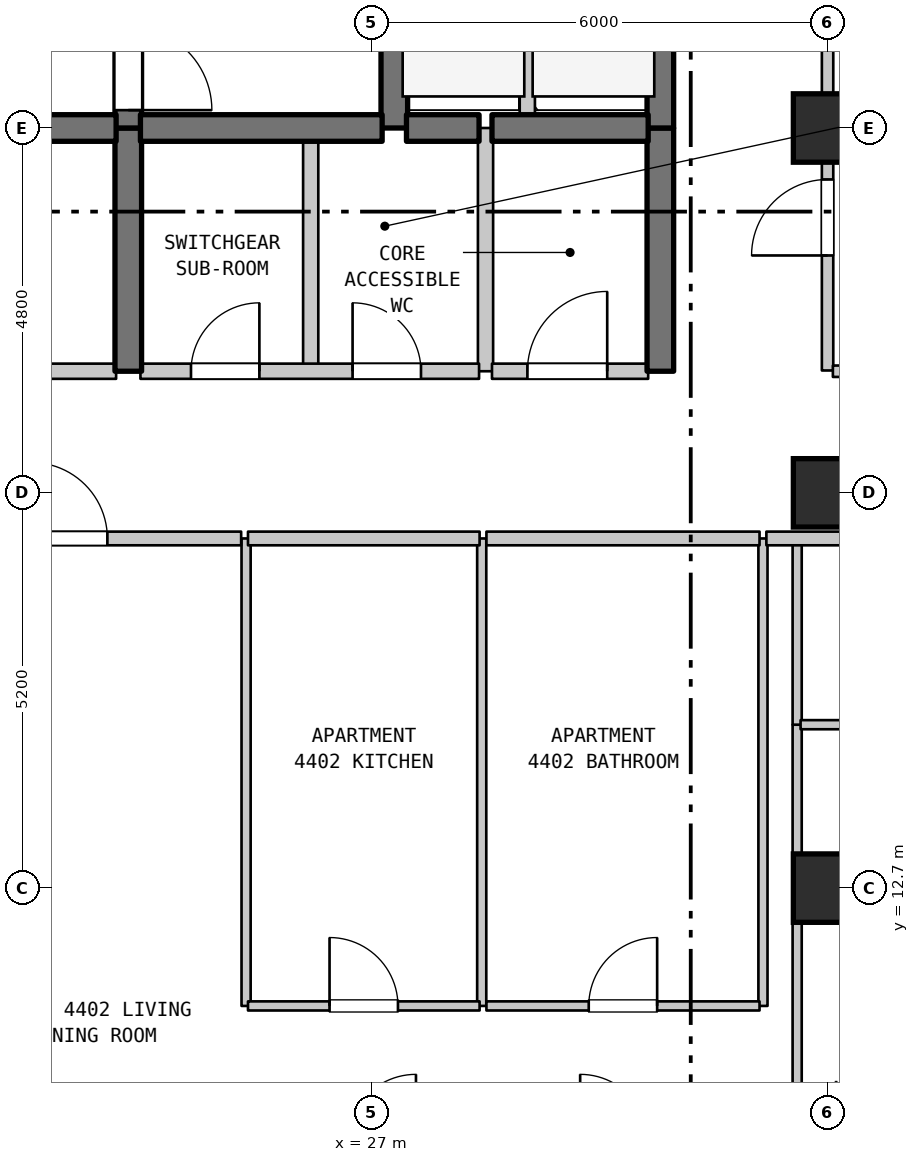
"""IFC4 building model, lengths in metres.
Left out: names, types, materials, properties, quantities, classifications, styles, units other than length and angle.
Written with IfcOpenShell. Run it as: python <this file> out.ifc"""

import sys

from ifc_helpers import new_model, si_unit, direction, frame, frame_2d, origin, origin_2d, place, context, subcontext, project, spatial, rectangle, extrude, element, fill, save


model = new_model("IFC4")
c1 = context("Model", 3, precision=1e-05, world=origin(), true_north=direction((0.0, 1.0)))
c2 = subcontext(c1, "Body", "Model", "MODEL_VIEW")
j1 = project(units=[si_unit("LENGTHUNIT", "METRE"), si_unit("PLANEANGLEUNIT", "RADIAN")], contexts=[c1])
p1 = place(None, origin())
s1 = spatial("IfcSite", under=j1, at=p1, CompositionType="ELEMENT")
p2 = place(p1, origin())
s2 = spatial("IfcBuilding", under=s1, at=p2, CompositionType="ELEMENT")
p3 = place(p2, frame((0.0, 0.0, 180.2)))
s3 = spatial("IfcBuildingStorey", under=s2, at=p3, CompositionType="ELEMENT", Elevation=180.2)
for number, where, z_axis, x_axis in (
    (1, (33.0, 12.7, 0.0), (0.0, 0.0, 1.0), (1.0, 0.0, 0.0)),
    (2, (33.0, 17.9, 0.0), (0.0, 0.0, 1.0), (1.0, 0.0, 0.0)),
    (3, (33.0, 22.7, 0.0), (0.0, 0.0, 1.0), (1.0, 0.0, 0.0)),
):
    element("IfcColumn", number, at=place(p3, frame(where, z_axis=z_axis, x_axis=x_axis)), inside=s3, PredefinedType="COLUMN", context=c2, shape_type="SweptSolid", body=[
        extrude(rectangle(XDim=0.9, YDim=0.9, at=origin_2d()), origin(), (0.0, 0.0, 1.0), 3.7),
    ])
p4 = place(p3, frame((23.8, 19.5, 0.0), z_axis=(0.0, 0.0, 1.0), x_axis=(0.0, 1.0, 0.0)))
e4 = element("IfcWall", 4, at=p4, inside=s3, PredefinedType="SHEAR", context=c2, shape_type="SweptSolid", body=[
    extrude(rectangle(XDim=3.2, YDim=0.35, at=frame_2d((1.6, 0.0))), origin(), (0.0, 0.0, 1.0), 3.38),
])
p5 = place(p3, frame((23.8, 22.7, 0.0), z_axis=(0.0, 0.0, 1.0), x_axis=(0.0, 1.0, 0.0)))
e5 = element("IfcWall", 5, at=p5, inside=s3, PredefinedType="SHEAR", context=c2, shape_type="SweptSolid", body=[
    extrude(rectangle(XDim=5.5, YDim=0.35, at=frame_2d((2.75, 0.0))), origin(), (0.0, 0.0, 1.0), 3.38),
])
p6 = place(p5, frame((0.235, 0.0, 0.0)))
e6 = element("IfcOpeningElement", 6, at=p6, cuts=e5, PredefinedType="OPENING", context=c2, shape_type="SweptSolid", body=[
    extrude(rectangle(XDim=1.1, YDim=2.15, at=frame_2d((0.55, 1.075))), frame((0.0, 0.185, 0.0), z_axis=(0.0, -1.0, 0.0), x_axis=(1.0, 0.0, 0.0)), (0.0, 0.0, 1.0), 0.37),
])
p7 = place(p3, frame((25.35, 11.15, 0.0), z_axis=(0.0, 0.0, 1.0), x_axis=(0.0, 1.0, 0.0)))
e7 = element("IfcWall", 7, at=p7, inside=s3, PredefinedType="PARTITIONING", context=c2, shape_type="SweptSolid", body=[
    extrude(rectangle(XDim=6.15, YDim=0.12, at=frame_2d((3.075, 0.0))), origin(), (0.0, 0.0, 1.0), 3.38),
])
p8 = place(p3, frame((26.2, 19.5, 0.0), z_axis=(0.0, 0.0, 1.0), x_axis=(0.0, 1.0, 0.0)))
e8 = element("IfcWall", 8, at=p8, inside=s3, PredefinedType="STANDARD", context=c2, shape_type="SweptSolid", body=[
    extrude(rectangle(XDim=3.2, YDim=0.2, at=frame_2d((1.6, 0.0))), origin(), (0.0, 0.0, 1.0), 3.38),
])
p9 = place(p3, frame((27.3, 22.7, 0.0), z_axis=(0.0, 0.0, 1.0), x_axis=(0.0, 1.0, 0.0)))
e9 = element("IfcWall", 9, at=p9, inside=s3, PredefinedType="SHEAR", context=c2, shape_type="SweptSolid", body=[
    extrude(rectangle(XDim=2.9, YDim=0.35, at=frame_2d((1.45, 0.0))), origin(), (0.0, 0.0, 1.0), 3.38),
])
p10 = place(p3, frame((28.45, 11.15, 0.0), z_axis=(0.0, 0.0, 1.0), x_axis=(0.0, 1.0, 0.0)))
e10 = element("IfcWall", 10, at=p10, inside=s3, PredefinedType="PARTITIONING", context=c2, shape_type="SweptSolid", body=[
    extrude(rectangle(XDim=6.15, YDim=0.12, at=frame_2d((3.075, 0.0))), origin(), (0.0, 0.0, 1.0), 3.38),
])
p11 = place(p3, frame((28.5, 19.5, 0.0), z_axis=(0.0, 0.0, 1.0), x_axis=(0.0, 1.0, 0.0)))
e11 = element("IfcWall", 11, at=p11, inside=s3, PredefinedType="STANDARD", context=c2, shape_type="SweptSolid", body=[
    extrude(rectangle(XDim=3.2, YDim=0.2, at=frame_2d((1.6, 0.0))), origin(), (0.0, 0.0, 1.0), 3.38),
])
p12 = place(p3, frame((29.05, 22.7, 0.0), z_axis=(0.0, 0.0, 1.0), x_axis=(0.0, 1.0, 0.0)))
e12 = element("IfcWall", 12, at=p12, inside=s3, PredefinedType="STANDARD", context=c2, shape_type="SweptSolid", body=[
    extrude(rectangle(XDim=2.9, YDim=0.2, at=frame_2d((1.45, 0.0))), origin(), (0.0, 0.0, 1.0), 3.38),
])
p13 = place(p3, frame((30.8, 19.5, 0.0), z_axis=(0.0, 0.0, 1.0), x_axis=(0.0, 1.0, 0.0)))
e13 = element("IfcWall", 13, at=p13, inside=s3, PredefinedType="SHEAR", context=c2, shape_type="SweptSolid", body=[
    extrude(rectangle(XDim=3.2, YDim=0.35, at=frame_2d((1.6, 0.0))), origin(), (0.0, 0.0, 1.0), 3.38),
])
p14 = place(p3, frame((30.8, 22.7, 0.0), z_axis=(0.0, 0.0, 1.0), x_axis=(0.0, 1.0, 0.0)))
e14 = element("IfcWall", 14, at=p14, inside=s3, PredefinedType="SHEAR", context=c2, shape_type="SweptSolid", body=[
    extrude(rectangle(XDim=2.9, YDim=0.35, at=frame_2d((1.45, 0.0))), origin(), (0.0, 0.0, 1.0), 3.38),
])
p15 = place(p3, frame((32.15, 11.15, 0.0), z_axis=(0.0, 0.0, 1.0), x_axis=(0.0, 1.0, 0.0)))
e15 = element("IfcWall", 15, at=p15, inside=s3, PredefinedType="PARTITIONING", context=c2, shape_type="SweptSolid", body=[
    extrude(rectangle(XDim=6.15, YDim=0.12, at=frame_2d((3.075, 0.0))), origin(), (0.0, 0.0, 1.0), 3.38),
])
p16 = place(p3, frame((32.6, 9.35, 0.0), z_axis=(0.0, 0.0, 1.0), x_axis=(0.0, 1.0, 0.0)))
e16 = element("IfcWall", 16, at=p16, inside=s3, PredefinedType="PARTITIONING", context=c2, shape_type="SweptSolid", body=[
    extrude(rectangle(XDim=5.5, YDim=0.12, at=frame_2d((2.75, 0.0))), origin(), (0.0, 0.0, 1.0), 3.38),
])
p17 = place(p3, frame((32.6, 14.85, 0.0), z_axis=(0.0, 0.0, 1.0), x_axis=(0.0, 1.0, 0.0)))
e17 = element("IfcWall", 17, at=p17, inside=s3, PredefinedType="PARTITIONING", context=c2, shape_type="SweptSolid", body=[
    extrude(rectangle(XDim=2.45, YDim=0.12, at=frame_2d((1.225, 0.0))), origin(), (0.0, 0.0, 1.0), 3.38),
])
p18 = place(p3, frame((33.0, 19.51, 0.0), z_axis=(0.0, 0.0, 1.0), x_axis=(0.0, 1.0, 0.0)))
e18 = element("IfcWall", 18, at=p18, inside=s3, PredefinedType="STANDARD", context=c2, shape_type="SweptSolid", body=[
    extrude(rectangle(XDim=5.99, YDim=0.15, at=frame_2d((2.995, 0.0))), origin(), (0.0, 0.0, 1.0), 2.98),
])
p19 = place(p18, frame((1.513, 0.0, 0.0)))
e19 = element("IfcOpeningElement", 19, at=p19, cuts=e18, PredefinedType="OPENING", context=c2, shape_type="SweptSolid", body=[
    extrude(rectangle(XDim=1.0, YDim=2.15, at=frame_2d((0.5, 1.075))), frame((0.0, 0.085, 0.0), z_axis=(0.0, -1.0, 0.0), x_axis=(1.0, 0.0, 0.0)), (0.0, 0.0, 1.0), 0.17),
])
p20 = place(p3, frame((25.375, 11.15, 0.0), z_axis=(0.0, 0.0, 1.0), x_axis=(1.0, 0.0, 0.0)))
e20 = element("IfcWall", 20, at=p20, inside=s3, PredefinedType="PARTITIONING", context=c2, shape_type="SweptSolid", body=[
    extrude(rectangle(XDim=3.047, YDim=0.12, at=frame_2d((1.523, 0.0))), origin(), (0.0, 0.0, 1.0), 3.38),
])
p21 = place(p20, frame((1.073, 0.0, 0.0)))
e21 = element("IfcOpeningElement", 21, at=p21, cuts=e20, PredefinedType="OPENING", context=c2, shape_type="SweptSolid", body=[
    extrude(rectangle(XDim=0.9, YDim=2.15, at=frame_2d((0.45, 1.075))), frame((0.0, 0.07, 0.0), z_axis=(0.0, -1.0, 0.0), x_axis=(1.0, 0.0, 0.0)), (0.0, 0.0, 1.0), 0.14),
])
p22 = place(p3, frame((28.512, 11.15, 0.0), z_axis=(0.0, 0.0, 1.0), x_axis=(1.0, 0.0, 0.0)))
e22 = element("IfcWall", 22, at=p22, inside=s3, PredefinedType="PARTITIONING", context=c2, shape_type="SweptSolid", body=[
    extrude(rectangle(XDim=3.593, YDim=0.12, at=frame_2d((1.796, 0.0))), origin(), (0.0, 0.0, 1.0), 3.38),
])
p23 = place(p22, frame((1.346, 0.0, 0.0)))
e23 = element("IfcOpeningElement", 23, at=p23, cuts=e22, PredefinedType="OPENING", context=c2, shape_type="SweptSolid", body=[
    extrude(rectangle(XDim=0.9, YDim=2.1, at=frame_2d((0.45, 1.05))), frame((0.0, 0.07, 0.0), z_axis=(0.0, -1.0, 0.0), x_axis=(1.0, 0.0, 0.0)), (0.0, 0.0, 1.0), 0.14),
])
p24 = place(p3, frame((32.645, 14.85, 0.0), z_axis=(0.0, 0.0, 1.0), x_axis=(1.0, 0.0, 0.0)))
e24 = element("IfcWall", 24, at=p24, inside=s3, PredefinedType="PARTITIONING", context=c2, shape_type="SweptSolid", body=[
    extrude(rectangle(XDim=2.16, YDim=0.12, at=frame_2d((1.08, 0.0))), origin(), (0.0, 0.0, 1.0), 3.38),
])
p25 = place(p24, frame((0.553, 0.0, 0.0)))
e25 = element("IfcOpeningElement", 25, at=p25, cuts=e24, PredefinedType="OPENING", context=c2, shape_type="SweptSolid", body=[
    extrude(rectangle(XDim=0.9, YDim=2.15, at=frame_2d((0.45, 1.075))), frame((0.0, 0.07, 0.0), z_axis=(0.0, -1.0, 0.0), x_axis=(1.0, 0.0, 0.0)), (0.0, 0.0, 1.0), 0.14),
])
p26 = place(p3, frame((20.765, 17.3, 0.0), z_axis=(0.0, 0.0, 1.0), x_axis=(1.0, 0.0, 0.0)))
e26 = element("IfcWall", 26, at=p26, inside=s3, PredefinedType="STANDARD", context=c2, shape_type="SweptSolid", body=[
    extrude(rectangle(XDim=4.52, YDim=0.18, at=frame_2d((2.26, 0.0))), origin(), (0.0, 0.0, 1.0), 3.38),
])
p27 = place(p26, frame((1.76, 0.0, 0.0)))
e27 = element("IfcOpeningElement", 27, at=p27, cuts=e26, PredefinedType="OPENING", context=c2, shape_type="SweptSolid", body=[
    extrude(rectangle(XDim=1.0, YDim=2.15, at=frame_2d((0.5, 1.075))), frame((0.0, 0.1, 0.0), z_axis=(0.0, -1.0, 0.0), x_axis=(1.0, 0.0, 0.0)), (0.0, 0.0, 1.0), 0.2),
])
p28 = place(p3, frame((25.375, 17.3, 0.0), z_axis=(0.0, 0.0, 1.0), x_axis=(1.0, 0.0, 0.0)))
e28 = element("IfcWall", 28, at=p28, inside=s3, PredefinedType="STANDARD", context=c2, shape_type="SweptSolid", body=[
    extrude(rectangle(XDim=3.047, YDim=0.18, at=frame_2d((1.523, 0.0))), origin(), (0.0, 0.0, 1.0), 3.38),
])
p29 = place(p3, frame((28.512, 17.3, 0.0), z_axis=(0.0, 0.0, 1.0), x_axis=(1.0, 0.0, 0.0)))
e29 = element("IfcWall", 29, at=p29, inside=s3, PredefinedType="STANDARD", context=c2, shape_type="SweptSolid", body=[
    extrude(rectangle(XDim=3.593, YDim=0.18, at=frame_2d((1.796, 0.0))), origin(), (0.0, 0.0, 1.0), 3.38),
])
p30 = place(p3, frame((32.195, 17.3, 0.0), z_axis=(0.0, 0.0, 1.0), x_axis=(1.0, 0.0, 0.0)))
e30 = element("IfcWall", 30, at=p30, inside=s3, PredefinedType="STANDARD", context=c2, shape_type="SweptSolid", body=[
    extrude(rectangle(XDim=5.14, YDim=0.18, at=frame_2d((2.57, 0.0))), origin(), (0.0, 0.0, 1.0), 3.38),
])
p31 = place(p30, frame((2.198, 0.0, 0.0)))
e31 = element("IfcOpeningElement", 31, at=p31, cuts=e30, PredefinedType="OPENING", context=c2, shape_type="SweptSolid", body=[
    extrude(rectangle(XDim=1.0, YDim=2.15, at=frame_2d((0.5, 1.075))), frame((0.0, 0.1, 0.0), z_axis=(0.0, -1.0, 0.0), x_axis=(1.0, 0.0, 0.0)), (0.0, 0.0, 1.0), 0.2),
])
p32 = place(p3, frame((19.16, 19.5, 0.0), z_axis=(0.0, 0.0, 1.0), x_axis=(1.0, 0.0, 0.0)))
e32 = element("IfcWall", 32, at=p32, inside=s3, PredefinedType="STANDARD", context=c2, shape_type="SweptSolid", body=[
    extrude(rectangle(XDim=4.48, YDim=0.2, at=frame_2d((2.24, 0.0))), origin(), (0.0, 0.0, 1.0), 3.38),
])
p33 = place(p32, frame((1.64, 0.0, 0.0)))
e33 = element("IfcOpeningElement", 33, at=p33, cuts=e32, PredefinedType="OPENING", context=c2, shape_type="SweptSolid", body=[
    extrude(rectangle(XDim=1.2, YDim=2.2, at=frame_2d((0.6, 1.1))), frame((0.0, 0.11, 0.0), z_axis=(0.0, -1.0, 0.0), x_axis=(1.0, 0.0, 0.0)), (0.0, 0.0, 1.0), 0.22),
])
p34 = place(p3, frame((23.96, 19.5, 0.0), z_axis=(0.0, 0.0, 1.0), x_axis=(1.0, 0.0, 0.0)))
e34 = element("IfcWall", 34, at=p34, inside=s3, PredefinedType="STANDARD", context=c2, shape_type="SweptSolid", body=[
    extrude(rectangle(XDim=4.455, YDim=0.2, at=frame_2d((2.228, 0.0))), origin(), (0.0, 0.0, 1.0), 3.38),
])
p35 = place(p34, frame((0.665, 0.0, 0.0)))
e35 = element("IfcOpeningElement", 35, at=p35, cuts=e34, PredefinedType="OPENING", context=c2, shape_type="SweptSolid", body=[
    extrude(rectangle(XDim=0.9, YDim=2.15, at=frame_2d((0.45, 1.075))), frame((0.0, 0.11, 0.0), z_axis=(0.0, -1.0, 0.0), x_axis=(1.0, 0.0, 0.0)), (0.0, 0.0, 1.0), 0.22),
])
p36 = place(p34, frame((2.791, 0.0, 0.0)))
e36 = element("IfcOpeningElement", 36, at=p36, cuts=e34, PredefinedType="OPENING", context=c2, shape_type="SweptSolid", body=[
    extrude(rectangle(XDim=0.9, YDim=2.15, at=frame_2d((0.45, 1.075))), frame((0.0, 0.11, 0.0), z_axis=(0.0, -1.0, 0.0), x_axis=(1.0, 0.0, 0.0)), (0.0, 0.0, 1.0), 0.22),
])
p37 = place(p3, frame((28.585, 19.5, 0.0), z_axis=(0.0, 0.0, 1.0), x_axis=(1.0, 0.0, 0.0)))
e37 = element("IfcWall", 37, at=p37, inside=s3, PredefinedType="STANDARD", context=c2, shape_type="SweptSolid", body=[
    extrude(rectangle(XDim=2.055, YDim=0.2, at=frame_2d((1.027, 0.0))), origin(), (0.0, 0.0, 1.0), 3.38),
])
p38 = place(p37, frame((0.466, 0.0, 0.0)))
e38 = element("IfcOpeningElement", 38, at=p38, cuts=e37, PredefinedType="OPENING", context=c2, shape_type="SweptSolid", body=[
    extrude(rectangle(XDim=1.05, YDim=2.15, at=frame_2d((0.525, 1.075))), frame((0.0, 0.11, 0.0), z_axis=(0.0, -1.0, 0.0), x_axis=(1.0, 0.0, 0.0)), (0.0, 0.0, 1.0), 0.22),
])
p39 = place(p3, frame((33.07, 19.5, 0.0), z_axis=(0.0, 0.0, 1.0), x_axis=(1.0, 0.0, 0.0)))
e39 = element("IfcWall", 39, at=p39, inside=s3, PredefinedType="STANDARD", context=c2, shape_type="SweptSolid", body=[
    extrude(rectangle(XDim=21.51, YDim=0.15, at=frame_2d((10.755, 0.0))), origin(), (0.0, 0.0, 1.0), 3.38),
])
p40 = place(p39, frame((10.185, 0.0, 0.0)))
e40 = element("IfcOpeningElement", 40, at=p40, cuts=e39, PredefinedType="OPENING", context=c2, shape_type="SweptSolid", body=[
    extrude(rectangle(XDim=1.0, YDim=2.15, at=frame_2d((0.5, 1.075))), frame((0.0, 0.085, 0.0), z_axis=(0.0, -1.0, 0.0), x_axis=(1.0, 0.0, 0.0)), (0.0, 0.0, 1.0), 0.17),
])
p41 = place(p3, frame((19.16, 22.7, 0.0), z_axis=(0.0, 0.0, 1.0), x_axis=(1.0, 0.0, 0.0)))
e41 = element("IfcWall", 41, at=p41, inside=s3, PredefinedType="SHEAR", context=c2, shape_type="SweptSolid", body=[
    extrude(rectangle(XDim=4.48, YDim=0.35, at=frame_2d((2.24, 0.0))), origin(), (0.0, 0.0, 1.0), 3.38),
])
p42 = place(p41, frame((1.64, 0.0, 0.0)))
e42 = element("IfcOpeningElement", 42, at=p42, cuts=e41, PredefinedType="OPENING", context=c2, shape_type="SweptSolid", body=[
    extrude(rectangle(XDim=1.2, YDim=2.2, at=frame_2d((0.6, 1.1))), frame((0.0, 0.185, 0.0), z_axis=(0.0, -1.0, 0.0), x_axis=(1.0, 0.0, 0.0)), (0.0, 0.0, 1.0), 0.37),
])
p43 = place(p3, frame((23.96, 22.7, 0.0), z_axis=(0.0, 0.0, 1.0), x_axis=(1.0, 0.0, 0.0)))
e43 = element("IfcWall", 43, at=p43, inside=s3, PredefinedType="SHEAR", context=c2, shape_type="SweptSolid", body=[
    extrude(rectangle(XDim=3.18, YDim=0.35, at=frame_2d((1.59, 0.0))), origin(), (0.0, 0.0, 1.0), 3.38),
])
p44 = place(p3, frame((27.46, 22.7, 0.0), z_axis=(0.0, 0.0, 1.0), x_axis=(1.0, 0.0, 0.0)))
e44 = element("IfcWall", 44, at=p44, inside=s3, PredefinedType="SHEAR", context=c2, shape_type="SweptSolid", body=[
    extrude(rectangle(XDim=0.955, YDim=0.35, at=frame_2d((0.478, 0.0))), origin(), (0.0, 0.0, 1.0), 3.38),
])
p45 = place(p3, frame((28.585, 22.7, 0.0), z_axis=(0.0, 0.0, 1.0), x_axis=(1.0, 0.0, 0.0)))
e45 = element("IfcWall", 45, at=p45, inside=s3, PredefinedType="SHEAR", context=c2, shape_type="SweptSolid", body=[
    extrude(rectangle(XDim=2.055, YDim=0.35, at=frame_2d((1.027, 0.0))), origin(), (0.0, 0.0, 1.0), 3.38),
])
p46 = place(p6, frame((1.1, 0.0, 0.0), z_axis=(0.0, 0.0, 1.0), x_axis=(-1.0, 0.0, 0.0)))
e46 = element("IfcDoor", 46, at=p46, inside=s3, OperationType="SINGLE_SWING_LEFT", PredefinedType="DOOR", context=c2, shape_type="SweptSolid", body=[
    extrude(rectangle(XDim=1.1, YDim=2.15, at=frame_2d((0.55, 1.075))), frame((0.0, 0.025, 0.0), z_axis=(0.0, -1.0, 0.0), x_axis=(1.0, 0.0, 0.0)), (0.0, 0.0, 1.0), 0.05),
])
fill(e6, e46)
p47 = place(p19, origin())
e47 = element("IfcDoor", 47, at=p47, inside=s3, OperationType="SINGLE_SWING_LEFT", PredefinedType="DOOR", context=c2, shape_type="SweptSolid", body=[
    extrude(rectangle(XDim=1.0, YDim=2.15, at=frame_2d((0.5, 1.075))), frame((0.0, 0.025, 0.0), z_axis=(0.0, -1.0, 0.0), x_axis=(1.0, 0.0, 0.0)), (0.0, 0.0, 1.0), 0.05),
])
fill(e19, e47)
p48 = place(p21, origin())
e48 = element("IfcDoor", 48, at=p48, inside=s3, OperationType="SINGLE_SWING_LEFT", PredefinedType="DOOR", context=c2, shape_type="SweptSolid", body=[
    extrude(rectangle(XDim=0.9, YDim=2.15, at=frame_2d((0.45, 1.075))), frame((0.0, 0.025, 0.0), z_axis=(0.0, -1.0, 0.0), x_axis=(1.0, 0.0, 0.0)), (0.0, 0.0, 1.0), 0.05),
])
fill(e21, e48)
p49 = place(p23, origin())
e49 = element("IfcDoor", 49, at=p49, inside=s3, OperationType="SINGLE_SWING_RIGHT", PredefinedType="DOOR", context=c2, shape_type="SweptSolid", body=[
    extrude(rectangle(XDim=0.9, YDim=2.1, at=frame_2d((0.45, 1.05))), frame((0.0, 0.025, 0.0), z_axis=(0.0, -1.0, 0.0), x_axis=(1.0, 0.0, 0.0)), (0.0, 0.0, 1.0), 0.05),
])
fill(e23, e49)
p50 = place(p27, origin())
e50 = element("IfcDoor", 50, at=p50, inside=s3, OperationType="SINGLE_SWING_LEFT", PredefinedType="DOOR", context=c2, shape_type="SweptSolid", body=[
    extrude(rectangle(XDim=1.0, YDim=2.15, at=frame_2d((0.5, 1.075))), frame((0.0, 0.025, 0.0), z_axis=(0.0, -1.0, 0.0), x_axis=(1.0, 0.0, 0.0)), (0.0, 0.0, 1.0), 0.05),
])
fill(e27, e50)
p51 = place(p35, origin())
e51 = element("IfcDoor", 51, at=p51, inside=s3, OperationType="SINGLE_SWING_RIGHT", PredefinedType="DOOR", context=c2, shape_type="SweptSolid", body=[
    extrude(rectangle(XDim=0.9, YDim=2.15, at=frame_2d((0.45, 1.075))), frame((0.0, 0.025, 0.0), z_axis=(0.0, -1.0, 0.0), x_axis=(1.0, 0.0, 0.0)), (0.0, 0.0, 1.0), 0.05),
])
fill(e35, e51)
p52 = place(p36, origin())
e52 = element("IfcDoor", 52, at=p52, inside=s3, OperationType="SINGLE_SWING_LEFT", PredefinedType="DOOR", context=c2, shape_type="SweptSolid", body=[
    extrude(rectangle(XDim=0.9, YDim=2.15, at=frame_2d((0.45, 1.075))), frame((0.0, 0.025, 0.0), z_axis=(0.0, -1.0, 0.0), x_axis=(1.0, 0.0, 0.0)), (0.0, 0.0, 1.0), 0.05),
])
fill(e36, e52)
p53 = place(p38, origin())
e53 = element("IfcDoor", 53, at=p53, inside=s3, OperationType="SINGLE_SWING_RIGHT", PredefinedType="DOOR", context=c2, shape_type="SweptSolid", body=[
    extrude(rectangle(XDim=1.05, YDim=2.15, at=frame_2d((0.525, 1.075))), frame((0.0, 0.025, 0.0), z_axis=(0.0, -1.0, 0.0), x_axis=(1.0, 0.0, 0.0)), (0.0, 0.0, 1.0), 0.05),
])
fill(e38, e53)
save(model, sys.argv[1])
